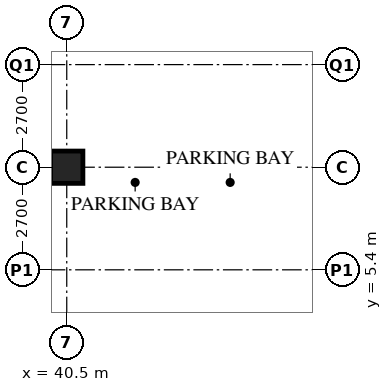
"""IFC4 building model, lengths in metres.
Left out: names, types, materials, properties, quantities, classifications, styles, units other than length and angle.
Written with IfcOpenShell. Run it as: python <this file> out.ifc"""

import sys

from ifc_helpers import new_model, si_unit, direction, frame, origin, origin_2d, place, context, subcontext, project, spatial, hollow_rectangle, extrude, element, save


model = new_model("IFC4")
c1 = context("Model", 3, precision=1e-05, world=origin(), true_north=direction((0.0, 1.0)))
c2 = subcontext(c1, "Body", "Model", "MODEL_VIEW")
j1 = project(units=[si_unit("LENGTHUNIT", "METRE"), si_unit("PLANEANGLEUNIT", "RADIAN")], contexts=[c1])
p1 = place(None, origin())
s1 = spatial("IfcSite", under=j1, at=p1, CompositionType="ELEMENT")
p2 = place(p1, origin())
s2 = spatial("IfcBuilding", under=s1, at=p2, CompositionType="ELEMENT")
p3 = place(p2, frame((0.0, 0.0, -4.2)))
s3 = spatial("IfcBuildingStorey", under=s2, at=p3, CompositionType="ELEMENT", Elevation=-4.2)
p4 = place(p3, frame((40.5, 8.1, 0.0), z_axis=(0.0, 0.0, 1.0), x_axis=(1.0, 0.0, 0.0)))
e1 = element("IfcColumn", 1, at=p4, inside=s3, PredefinedType="COLUMN", context=c2, shape_type="SweptSolid", body=[
    extrude(hollow_rectangle(XDim=0.85, YDim=0.85, WallThickness=0.085, at=origin_2d()), origin(), (0.0, 0.0, 1.0), 4.2),
])
save(model, sys.argv[1])
